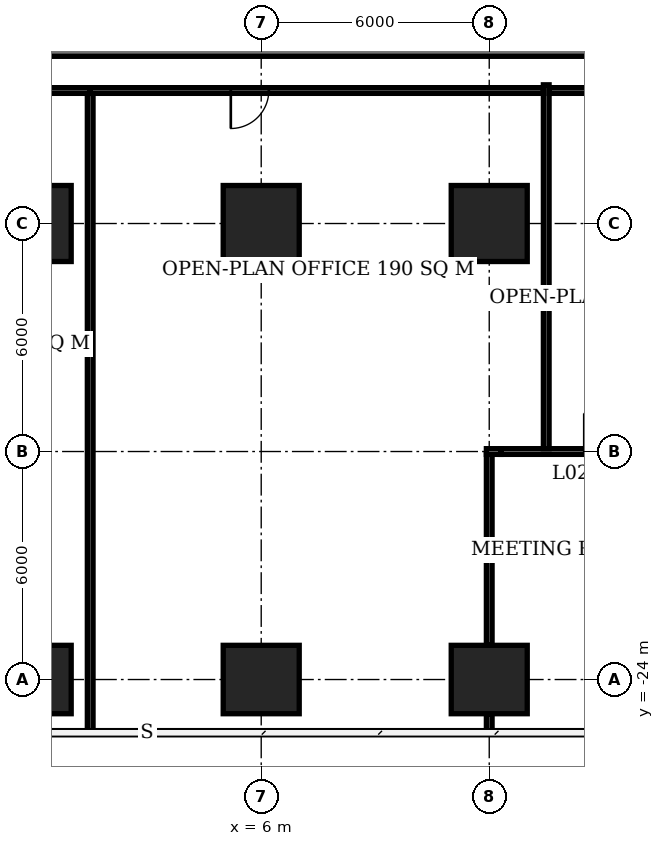
"""IFC4 building model, lengths in metres.
Left out: names, types, materials, properties, quantities, classifications, styles, units other than length and angle.
Written with IfcOpenShell. Run it as: python <this file> out.ifc"""

import sys

from ifc_helpers import new_model, si_unit, direction, frame, frame_2d, origin, origin_2d, place, context, subcontext, project, spatial, rectangle, extrude, element, fill, save


model = new_model("IFC4")
c1 = context("Model", 3, precision=1e-05, world=origin(), true_north=direction((0.0, 1.0)))
c2 = subcontext(c1, "Body", "Model", "MODEL_VIEW")
j1 = project(units=[si_unit("LENGTHUNIT", "METRE"), si_unit("PLANEANGLEUNIT", "RADIAN")], contexts=[c1])
p1 = place(None, origin())
s1 = spatial("IfcSite", under=j1, at=p1, CompositionType="ELEMENT")
p2 = place(p1, origin())
s2 = spatial("IfcBuilding", under=s1, at=p2, CompositionType="ELEMENT")
p3 = place(p2, frame((0.0, 0.0, 11.0)))
s3 = spatial("IfcBuildingStorey", under=s2, at=p3, CompositionType="ELEMENT", Elevation=11.0)
p4 = place(p3, frame((0.0, -24.0, 0.0), z_axis=(0.0, 0.0, 1.0), x_axis=(1.0, 0.0, 0.0)))
e1 = element("IfcColumn", 1, at=p4, inside=s3, PredefinedType="COLUMN", context=c2, shape_type="SweptSolid", body=[
    extrude(rectangle(XDim=2.0, YDim=1.8, at=origin_2d()), origin(), (0.0, 0.0, 1.0), 7.2),
])
p5 = place(p3, frame((0.0, -12.0, 0.0), z_axis=(0.0, 0.0, 1.0), x_axis=(1.0, 0.0, 0.0)))
e2 = element("IfcColumn", 2, at=p5, inside=s3, PredefinedType="COLUMN", context=c2, shape_type="SweptSolid", body=[
    extrude(rectangle(XDim=2.0, YDim=2.0, at=origin_2d()), origin(), (0.0, 0.0, 1.0), 7.2),
])
p6 = place(p3, frame((6.0, -24.0, 0.0), z_axis=(0.0, 0.0, 1.0), x_axis=(1.0, 0.0, 0.0)))
e3 = element("IfcColumn", 3, at=p6, inside=s3, PredefinedType="COLUMN", context=c2, shape_type="SweptSolid", body=[
    extrude(rectangle(XDim=2.0, YDim=1.8, at=origin_2d()), origin(), (0.0, 0.0, 1.0), 7.2),
])
p7 = place(p3, frame((6.0, -12.0, 0.0), z_axis=(0.0, 0.0, 1.0), x_axis=(1.0, 0.0, 0.0)))
e4 = element("IfcColumn", 4, at=p7, inside=s3, PredefinedType="COLUMN", context=c2, shape_type="SweptSolid", body=[
    extrude(rectangle(XDim=2.0, YDim=2.0, at=origin_2d()), origin(), (0.0, 0.0, 1.0), 7.2),
])
p8 = place(p3, frame((12.0, -24.0, 0.0), z_axis=(0.0, 0.0, 1.0), x_axis=(1.0, 0.0, 0.0)))
e5 = element("IfcColumn", 5, at=p8, inside=s3, PredefinedType="COLUMN", context=c2, shape_type="SweptSolid", body=[
    extrude(rectangle(XDim=2.0, YDim=1.8, at=origin_2d()), origin(), (0.0, 0.0, 1.0), 7.2),
])
p9 = place(p3, frame((12.0, -12.0, 0.0), z_axis=(0.0, 0.0, 1.0), x_axis=(1.0, 0.0, 0.0)))
e6 = element("IfcColumn", 6, at=p9, inside=s3, PredefinedType="COLUMN", context=c2, shape_type="SweptSolid", body=[
    extrude(rectangle(XDim=2.0, YDim=2.0, at=origin_2d()), origin(), (0.0, 0.0, 1.0), 7.2),
])
p10 = place(p3, frame((-5.6, -6.6, 0.0), z_axis=(0.0, 0.0, 1.0), x_axis=(1.0, 0.0, 0.0)))
e7 = element("IfcWall", 7, at=p10, inside=s3, PredefinedType="SHEAR", context=c2, shape_type="SweptSolid", body=[
    extrude(rectangle(XDim=23.2, YDim=2.0, at=frame_2d((11.6, 0.0))), origin(), (0.0, 0.0, 1.0), 7.2),
])
p11 = place(p3, frame((11.925, -18.0, 0.0), z_axis=(0.0, 0.0, 1.0), x_axis=(1.0, 0.0, 0.0)))
e8 = element("IfcWall", 8, at=p11, inside=s3, PredefinedType="PARTITIONING", context=c2, shape_type="SweptSolid", body=[
    extrude(rectangle(XDim=0.385, YDim=0.15, at=frame_2d((0.192, 0.0))), origin(), (0.0, 0.0, 1.0), 6.35),
])
p12 = place(p3, frame((12.31, -18.0, 0.0), z_axis=(0.0, 0.0, 1.0), x_axis=(1.0, 0.0, 0.0)))
e9 = element("IfcWall", 9, at=p12, inside=s3, PredefinedType="PARTITIONING", context=c2, shape_type="SweptSolid", body=[
    extrude(rectangle(XDim=5.38, YDim=0.15, at=frame_2d((2.69, 0.0))), origin(), (0.0, 0.0, 1.0), 6.95),
])
p13 = place(p12, frame((2.19, 0.0, 0.0)))
e10 = element("IfcOpeningElement", 10, at=p13, cuts=e9, PredefinedType="OPENING", context=c2, shape_type="SweptSolid", body=[
    extrude(rectangle(XDim=1.0, YDim=2.1, at=frame_2d((0.5, 1.05))), frame((0.0, 0.085, 0.0), z_axis=(0.0, -1.0, 0.0), x_axis=(1.0, 0.0, 0.0)), (0.0, 0.0, 1.0), 0.17),
])
p14 = place(p3, frame((12.0, -25.375, 0.0), z_axis=(0.0, 0.0, 1.0), x_axis=(0.0, 1.0, 0.0)))
e11 = element("IfcWall", 11, at=p14, inside=s3, PredefinedType="PARTITIONING", context=c2, shape_type="SweptSolid", body=[
    extrude(rectangle(XDim=0.475, YDim=0.15, at=frame_2d((0.238, 0.0))), origin(), (0.0, 0.0, 1.0), 6.95),
])
p15 = place(p3, frame((12.0, -23.1, 0.0), z_axis=(0.0, 0.0, 1.0), x_axis=(0.0, 1.0, 0.0)))
e12 = element("IfcWall", 12, at=p15, inside=s3, PredefinedType="PARTITIONING", context=c2, shape_type="SweptSolid", body=[
    extrude(rectangle(XDim=5.025, YDim=0.15, at=frame_2d((2.513, 0.0))), origin(), (0.0, 0.0, 1.0), 6.35),
])
p16 = place(p3, frame((-5.6, -8.5, 0.0), z_axis=(0.0, 0.0, 1.0), x_axis=(1.0, 0.0, 0.0)))
e13 = element("IfcWall", 13, at=p16, inside=s3, PredefinedType="PARTITIONING", context=c2, shape_type="SweptSolid", body=[
    extrude(rectangle(XDim=7.1, YDim=0.15, at=frame_2d((3.55, 0.0))), origin(), (0.0, 0.0, 1.0), 6.95),
])
p17 = place(p3, frame((1.5, -25.375, 0.0), z_axis=(0.0, 0.0, 1.0), x_axis=(0.0, 1.0, 0.0)))
e14 = element("IfcWall", 14, at=p17, inside=s3, PredefinedType="PARTITIONING", context=c2, shape_type="SweptSolid", body=[
    extrude(rectangle(XDim=16.8, YDim=0.15, at=frame_2d((8.4, 0.0))), origin(), (0.0, 0.0, 1.0), 6.95),
])
p18 = place(p3, frame((13.425, -8.5, 0.0), z_axis=(0.0, 0.0, 1.0), x_axis=(-1.0, 0.0, 0.0)))
e15 = element("IfcWall", 15, at=p18, inside=s3, PredefinedType="PARTITIONING", context=c2, shape_type="SweptSolid", body=[
    extrude(rectangle(XDim=11.925, YDim=0.15, at=frame_2d((5.962, 0.0))), origin(), (0.0, 0.0, 1.0), 6.95),
])
p19 = place(p18, frame((7.225, 0.0, 0.0)))
e16 = element("IfcOpeningElement", 16, at=p19, cuts=e15, PredefinedType="OPENING", context=c2, shape_type="SweptSolid", body=[
    extrude(rectangle(XDim=1.0, YDim=2.1, at=frame_2d((0.5, 1.05))), frame((0.0, 0.085, 0.0), z_axis=(0.0, -1.0, 0.0), x_axis=(1.0, 0.0, 0.0)), (0.0, 0.0, 1.0), 0.17),
])
p20 = place(p3, frame((13.5, -17.925, 0.0), z_axis=(0.0, 0.0, 1.0), x_axis=(0.0, 1.0, 0.0)))
e17 = element("IfcWall", 17, at=p20, inside=s3, PredefinedType="PARTITIONING", context=c2, shape_type="SweptSolid", body=[
    extrude(rectangle(XDim=9.575, YDim=0.15, at=frame_2d((4.788, 0.0))), origin(), (0.0, 0.0, 1.0), 6.95),
])
p21 = place(p3, frame((13.575, -8.5, 0.0), z_axis=(0.0, 0.0, 1.0), x_axis=(1.0, 0.0, 0.0)))
e18 = element("IfcWall", 18, at=p21, inside=s3, PredefinedType="PARTITIONING", context=c2, shape_type="SweptSolid", body=[
    extrude(rectangle(XDim=4.025, YDim=0.15, at=frame_2d((2.013, 0.0))), origin(), (0.0, 0.0, 1.0), 6.95),
])
p22 = place(p19, origin())
e19 = element("IfcDoor", 19, at=p22, inside=s3, OperationType="SINGLE_SWING_RIGHT", PredefinedType="DOOR", context=c2, shape_type="SweptSolid", body=[
    extrude(rectangle(XDim=1.0, YDim=2.1, at=frame_2d((0.5, 1.05))), frame((0.0, 0.025, 0.0), z_axis=(0.0, -1.0, 0.0), x_axis=(1.0, 0.0, 0.0)), (0.0, 0.0, 1.0), 0.05),
])
fill(e16, e19)
save(model, sys.argv[1])
